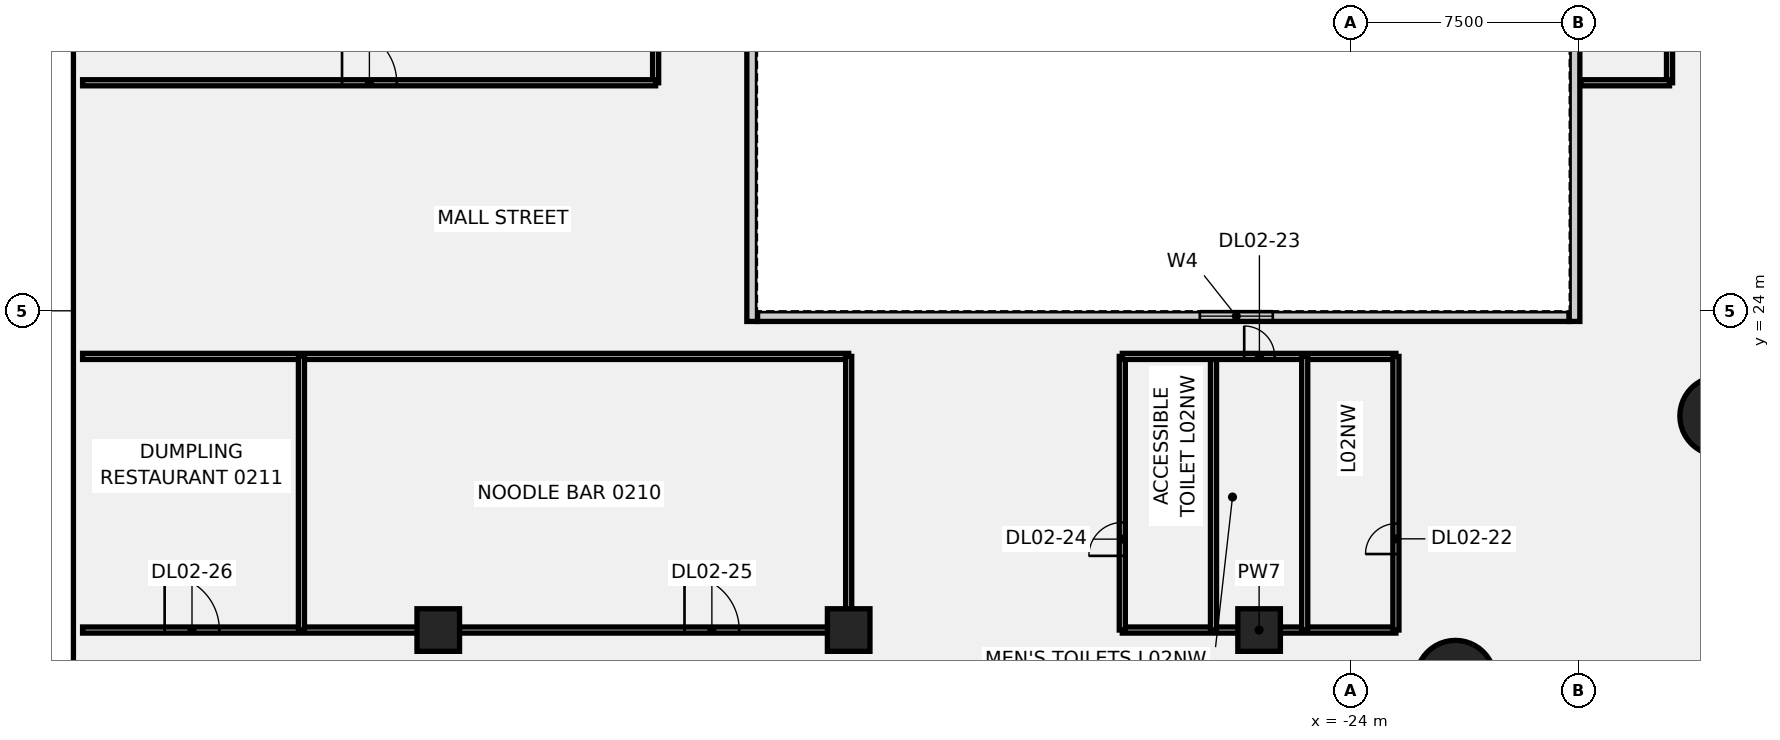
"""IFC4 building model, lengths in metres.
Left out: names, types, materials, properties, quantities, classifications, styles, units other than length and angle.
Written with IfcOpenShell. Run it as: python <this file> out.ifc"""

import sys

from ifc_helpers import new_model, si_unit, direction, frame, frame_2d, origin, origin_2d, place, context, subcontext, project, spatial, rectangle, circle, extrude, element, fill, save


model = new_model("IFC4")
c1 = context("Model", 3, precision=1e-05, world=origin(), true_north=direction((0.0, 1.0)))
c2 = subcontext(c1, "Body", "Model", "MODEL_VIEW")
j1 = project(units=[si_unit("LENGTHUNIT", "METRE"), si_unit("PLANEANGLEUNIT", "RADIAN")], contexts=[c1])
p1 = place(None, origin())
s1 = spatial("IfcSite", under=j1, at=p1, CompositionType="ELEMENT")
p2 = place(p1, origin())
s2 = spatial("IfcBuilding", under=s1, at=p2, CompositionType="ELEMENT")
p3 = place(p2, frame((0.0, 0.0, 15.0)))
s3 = spatial("IfcBuildingStorey", under=s2, at=p3, CompositionType="ELEMENT", Elevation=15.0)
for number, where, z_axis, x_axis in (
    (1, (-11.86, 20.543, -0.5), (0.0, 0.0, 1.0), (1.0, 0.0, 0.0)),
    (2, (-20.543, 11.86, -0.5), (0.0, 0.0, 1.0), (1.0, 0.0, 0.0)),
):
    element("IfcColumn", number, at=place(p3, frame(where, z_axis=z_axis, x_axis=x_axis)), inside=s3, PredefinedType="COLUMN", context=c2, shape_type="SweptSolid", body=[
        extrude(circle(Radius=1.3, at=origin_2d()), origin(), (0.0, 0.0, 1.0), 5.0),
    ])
for number, where, z_axis, x_axis in (
    (3, (-54.0, 13.5, -0.5), (0.0, 0.0, 1.0), (1.0, 0.0, 0.0)),
    (4, (-40.5, 13.5, -0.5), (0.0, 0.0, 1.0), (1.0, 0.0, 0.0)),
    (5, (-27.0, 13.5, -0.5), (0.0, 0.0, 1.0), (1.0, 0.0, 0.0)),
):
    element("IfcColumn", number, at=place(p3, frame(where, z_axis=z_axis, x_axis=x_axis)), inside=s3, PredefinedType="COLUMN", context=c2, shape_type="SweptSolid", body=[
        extrude(rectangle(XDim=1.4, YDim=1.4, at=origin_2d()), origin(), (0.0, 0.0, 1.0), 5.0),
    ])
p4 = place(p3, frame((-65.699, 13.5, 0.0), z_axis=(0.0, 0.0, 1.0), x_axis=(1.0, 0.0, 0.0)))
e6 = element("IfcWall", 6, at=p4, inside=s3, PredefinedType="PARTITIONING", context=c2, shape_type="SweptSolid", body=[
    extrude(rectangle(XDim=25.199, YDim=0.2, at=frame_2d((12.6, 0.0))), origin(), (0.0, 0.0, 1.0), 4.5),
])
p5 = place(p4, frame((19.799, 0.0, 0.0)))
e7 = element("IfcOpeningElement", 7, at=p5, cuts=e6, PredefinedType="OPENING", context=c2, shape_type="SweptSolid", body=[
    extrude(rectangle(XDim=1.8, YDim=2.1, at=frame_2d((0.9, 1.05))), frame((0.0, 0.11, 0.0), z_axis=(0.0, -1.0, 0.0), x_axis=(1.0, 0.0, 0.0)), (0.0, 0.0, 1.0), 0.22),
])
p6 = place(p4, frame((2.699, 0.0, 0.0)))
e8 = element("IfcOpeningElement", 8, at=p6, cuts=e6, PredefinedType="OPENING", context=c2, shape_type="SweptSolid", body=[
    extrude(rectangle(XDim=1.8, YDim=2.1, at=frame_2d((0.9, 1.05))), frame((0.0, 0.11, 0.0), z_axis=(0.0, -1.0, 0.0), x_axis=(1.0, 0.0, 0.0)), (0.0, 0.0, 1.0), 0.22),
])
p7 = place(p3, frame((-65.699, 22.5, 0.0), z_axis=(0.0, 0.0, 1.0), x_axis=(1.0, 0.0, 0.0)))
e9 = element("IfcWall", 9, at=p7, inside=s3, PredefinedType="PARTITIONING", context=c2, shape_type="SweptSolid", body=[
    extrude(rectangle(XDim=25.199, YDim=0.2, at=frame_2d((12.6, 0.0))), origin(), (0.0, 0.0, 1.0), 4.5),
])
p8 = place(p3, frame((-46.85, 31.5, 0.0), z_axis=(0.0, 0.0, 1.0), x_axis=(0.0, 1.0, 0.0)))
e10 = element("IfcWall", 10, at=p8, inside=s3, PredefinedType="PARTITIONING", context=c2, shape_type="SweptSolid", body=[
    extrude(rectangle(XDim=9.0, YDim=0.2, at=frame_2d((4.5, 0.0))), origin(), (0.0, 0.0, 1.0), 4.5),
])
p9 = place(p3, frame((-65.699, 31.5, 0.0), z_axis=(0.0, 0.0, 1.0), x_axis=(1.0, 0.0, 0.0)))
e11 = element("IfcWall", 11, at=p9, inside=s3, PredefinedType="PARTITIONING", context=c2, shape_type="SweptSolid", body=[
    extrude(rectangle(XDim=18.849, YDim=0.2, at=frame_2d((9.424, 0.0))), origin(), (0.0, 0.0, 1.0), 4.5),
])
p10 = place(p9, frame((8.534, 0.0, 0.0)))
e12 = element("IfcOpeningElement", 12, at=p10, cuts=e11, PredefinedType="OPENING", context=c2, shape_type="SweptSolid", body=[
    extrude(rectangle(XDim=1.8, YDim=2.1, at=frame_2d((0.9, 1.05))), frame((0.0, 0.11, 0.0), z_axis=(0.0, -1.0, 0.0), x_axis=(1.0, 0.0, 0.0)), (0.0, 0.0, 1.0), 0.22),
])
for number, where, z_axis, x_axis in (
    (13, (-40.5, 13.5, 0.0), (0.0, 0.0, 1.0), (0.0, 1.0, 0.0)),
    (14, (-58.5, 13.5, 0.0), (0.0, 0.0, 1.0), (0.0, 1.0, 0.0)),
    (15, (-31.5, 13.5, 0.0), (0.0, 0.0, 1.0), (1.0, 0.0, 0.0)),
    (16, (-28.5, 13.5, 0.0), (0.0, 0.0, 1.0), (0.0, 1.0, 0.0)),
):
    element("IfcWall", number, at=place(p3, frame(where, z_axis=z_axis, x_axis=x_axis)), inside=s3, PredefinedType="PARTITIONING", context=c2, shape_type="SweptSolid", body=[
        extrude(rectangle(XDim=9.0, YDim=0.2, at=frame_2d((4.5, 0.0))), origin(), (0.0, 0.0, 1.0), 4.5),
    ])
p11 = place(p3, frame((-31.5, 13.5, 0.0), z_axis=(0.0, 0.0, 1.0), x_axis=(0.0, 1.0, 0.0)))
e17 = element("IfcWall", 17, at=p11, inside=s3, PredefinedType="PARTITIONING", context=c2, shape_type="SweptSolid", body=[
    extrude(rectangle(XDim=9.0, YDim=0.2, at=frame_2d((4.5, 0.0))), origin(), (0.0, 0.0, 1.0), 4.5),
])
p12 = place(p11, frame((2.44, 0.0, 0.0)))
e18 = element("IfcOpeningElement", 18, at=p12, cuts=e17, PredefinedType="OPENING", context=c2, shape_type="SweptSolid", body=[
    extrude(rectangle(XDim=1.1, YDim=2.1, at=frame_2d((0.55, 1.05))), frame((0.0, 0.11, 0.0), z_axis=(0.0, -1.0, 0.0), x_axis=(1.0, 0.0, 0.0)), (0.0, 0.0, 1.0), 0.22),
])
p13 = place(p3, frame((-31.5, 22.5, 0.0), z_axis=(0.0, 0.0, 1.0), x_axis=(1.0, 0.0, 0.0)))
e19 = element("IfcWall", 19, at=p13, inside=s3, PredefinedType="PARTITIONING", context=c2, shape_type="SweptSolid", body=[
    extrude(rectangle(XDim=9.0, YDim=0.2, at=frame_2d((4.5, 0.0))), origin(), (0.0, 0.0, 1.0), 4.5),
])
p14 = place(p13, frame((4.01, 0.0, 0.0)))
e20 = element("IfcOpeningElement", 20, at=p14, cuts=e19, PredefinedType="OPENING", context=c2, shape_type="SweptSolid", body=[
    extrude(rectangle(XDim=1.0, YDim=2.1, at=frame_2d((0.5, 1.05))), frame((0.0, 0.11, 0.0), z_axis=(0.0, -1.0, 0.0), x_axis=(1.0, 0.0, 0.0)), (0.0, 0.0, 1.0), 0.22),
])
p15 = place(p3, frame((-22.5, 13.5, 0.0), z_axis=(0.0, 0.0, 1.0), x_axis=(0.0, 1.0, 0.0)))
e21 = element("IfcWall", 21, at=p15, inside=s3, PredefinedType="PARTITIONING", context=c2, shape_type="SweptSolid", body=[
    extrude(rectangle(XDim=9.0, YDim=0.2, at=frame_2d((4.5, 0.0))), origin(), (0.0, 0.0, 1.0), 4.5),
])
p16 = place(p15, frame((2.5, 0.0, 0.0)))
e22 = element("IfcOpeningElement", 22, at=p16, cuts=e21, PredefinedType="OPENING", context=c2, shape_type="SweptSolid", body=[
    extrude(rectangle(XDim=1.0, YDim=2.1, at=frame_2d((0.5, 1.05))), frame((0.0, 0.11, 0.0), z_axis=(0.0, -1.0, 0.0), x_axis=(1.0, 0.0, 0.0)), (0.0, 0.0, 1.0), 0.22),
])
p17 = place(p3, frame((-25.5, 13.5, 0.0), z_axis=(0.0, 0.0, 1.0), x_axis=(0.0, 1.0, 0.0)))
e23 = element("IfcWall", 23, at=p17, inside=s3, PredefinedType="PARTITIONING", context=c2, shape_type="SweptSolid", body=[
    extrude(rectangle(XDim=9.0, YDim=0.2, at=frame_2d((4.5, 0.0))), origin(), (0.0, 0.0, 1.0), 4.5),
])
p18 = place(p3, frame((-13.5, 31.5, 0.0), z_axis=(0.0, 0.0, 1.0), x_axis=(0.0, 1.0, 0.0)))
e24 = element("IfcWall", 24, at=p18, inside=s3, PredefinedType="PARTITIONING", context=c2, shape_type="SweptSolid", body=[
    extrude(rectangle(XDim=9.0, YDim=0.2, at=frame_2d((4.5, 0.0))), origin(), (0.0, 0.0, 1.0), 4.5),
])
p19 = place(p18, frame((3.61, 0.0, 0.0)))
e25 = element("IfcOpeningElement", 25, at=p19, cuts=e24, PredefinedType="OPENING", context=c2, shape_type="SweptSolid", body=[
    extrude(rectangle(XDim=1.8, YDim=2.1, at=frame_2d((0.9, 1.05))), frame((0.0, 0.11, 0.0), z_axis=(0.0, -1.0, 0.0), x_axis=(1.0, 0.0, 0.0)), (0.0, 0.0, 1.0), 0.22),
])
p20 = place(p3, frame((-16.42, 31.5, 0.0), z_axis=(0.0, 0.0, 1.0), x_axis=(1.0, 0.0, 0.0)))
e26 = element("IfcWall", 26, at=p20, inside=s3, PredefinedType="PARTITIONING", context=c2, shape_type="SweptSolid", body=[
    extrude(rectangle(XDim=2.92, YDim=0.2, at=frame_2d((1.46, 0.0))), origin(), (0.0, 0.0, 1.0), 4.5),
])
p21 = place(p3, frame((-43.5, 23.825, 0.0), z_axis=(0.0, 0.0, 1.0), x_axis=(1.0, 0.0, 0.0)))
e27 = element("IfcWall", 27, at=p21, inside=s3, PredefinedType="SOLIDWALL", context=c2, shape_type="SweptSolid", body=[
    extrude(rectangle(XDim=26.7, YDim=0.35, at=frame_2d((13.35, 0.0))), origin(), (0.0, 0.0, 1.0), 4.5),
])
p22 = place(p21, frame((14.55, 0.0, 1.0)))
e28 = element("IfcOpeningElement", 28, at=p22, cuts=e27, PredefinedType="OPENING", context=c2, shape_type="SweptSolid", body=[
    extrude(rectangle(XDim=2.4, YDim=1.8, at=frame_2d((1.2, 0.9))), frame((0.0, 0.185, 0.0), z_axis=(0.0, -1.0, 0.0), x_axis=(1.0, 0.0, 0.0)), (0.0, 0.0, 1.0), 0.37),
])
p23 = place(p3, frame((-43.675, 23.65, 0.0), z_axis=(0.0, 0.0, 1.0), x_axis=(0.0, 1.0, 0.0)))
e29 = element("IfcWall", 29, at=p23, inside=s3, PredefinedType="SOLIDWALL", context=c2, shape_type="SweptSolid", body=[
    extrude(rectangle(XDim=18.7, YDim=0.35, at=frame_2d((9.35, 0.0))), origin(), (0.0, 0.0, 1.0), 4.5),
])
p24 = place(p23, frame((14.3, 0.0, 1.0)))
e30 = element("IfcOpeningElement", 30, at=p24, cuts=e29, PredefinedType="OPENING", context=c2, shape_type="SweptSolid", body=[
    extrude(rectangle(XDim=2.4, YDim=1.8, at=frame_2d((1.2, 0.9))), frame((0.0, 0.185, 0.0), z_axis=(0.0, -1.0, 0.0), x_axis=(1.0, 0.0, 0.0)), (0.0, 0.0, 1.0), 0.37),
])
p25 = place(p3, frame((-16.625, 23.65, 0.0), z_axis=(0.0, 0.0, 1.0), x_axis=(0.0, 1.0, 0.0)))
e31 = element("IfcWall", 31, at=p25, inside=s3, PredefinedType="SOLIDWALL", context=c2, shape_type="SweptSolid", body=[
    extrude(rectangle(XDim=18.7, YDim=0.35, at=frame_2d((9.35, 0.0))), origin(), (0.0, 0.0, 1.0), 4.5),
])
p26 = place(p25, frame((14.3, 0.0, 1.0)))
e32 = element("IfcOpeningElement", 32, at=p26, cuts=e31, PredefinedType="OPENING", context=c2, shape_type="SweptSolid", body=[
    extrude(rectangle(XDim=2.4, YDim=1.8, at=frame_2d((1.2, 0.9))), frame((0.0, 0.185, 0.0), z_axis=(0.0, -1.0, 0.0), x_axis=(1.0, 0.0, 0.0)), (0.0, 0.0, 1.0), 0.37),
])
p27 = place(p16, origin())
e33 = element("IfcDoor", 33, at=p27, inside=s3, OperationType="SINGLE_SWING_RIGHT", PredefinedType="DOOR", context=c2, shape_type="SweptSolid", body=[
    extrude(rectangle(XDim=1.0, YDim=2.1, at=frame_2d((0.5, 1.05))), frame((0.0, 0.025, 0.0), z_axis=(0.0, -1.0, 0.0), x_axis=(1.0, 0.0, 0.0)), (0.0, 0.0, 1.0), 0.05),
])
fill(e22, e33)
p28 = place(p14, origin())
e34 = element("IfcDoor", 34, at=p28, inside=s3, OperationType="SINGLE_SWING_LEFT", PredefinedType="DOOR", context=c2, shape_type="SweptSolid", body=[
    extrude(rectangle(XDim=1.0, YDim=2.1, at=frame_2d((0.5, 1.05))), frame((0.0, 0.025, 0.0), z_axis=(0.0, -1.0, 0.0), x_axis=(1.0, 0.0, 0.0)), (0.0, 0.0, 1.0), 0.05),
])
fill(e20, e34)
p29 = place(p12, origin())
e35 = element("IfcDoor", 35, at=p29, inside=s3, OperationType="SINGLE_SWING_RIGHT", PredefinedType="DOOR", context=c2, shape_type="SweptSolid", body=[
    extrude(rectangle(XDim=1.1, YDim=2.1, at=frame_2d((0.55, 1.05))), frame((0.0, 0.025, 0.0), z_axis=(0.0, -1.0, 0.0), x_axis=(1.0, 0.0, 0.0)), (0.0, 0.0, 1.0), 0.05),
])
fill(e18, e35)
p30 = place(p5, origin())
e36 = element("IfcDoor", 36, at=p30, inside=s3, OperationType="SINGLE_SWING_LEFT", PredefinedType="DOOR", context=c2, shape_type="SweptSolid", body=[
    extrude(rectangle(XDim=1.8, YDim=2.1, at=frame_2d((0.9, 1.05))), frame((0.0, 0.025, 0.0), z_axis=(0.0, -1.0, 0.0), x_axis=(1.0, 0.0, 0.0)), (0.0, 0.0, 1.0), 0.05),
])
fill(e7, e36)
p31 = place(p6, origin())
e37 = element("IfcDoor", 37, at=p31, inside=s3, OperationType="SINGLE_SWING_RIGHT", PredefinedType="DOOR", context=c2, shape_type="SweptSolid", body=[
    extrude(rectangle(XDim=1.8, YDim=2.1, at=frame_2d((0.9, 1.05))), frame((0.0, 0.025, 0.0), z_axis=(0.0, -1.0, 0.0), x_axis=(1.0, 0.0, 0.0)), (0.0, 0.0, 1.0), 0.05),
])
fill(e8, e37)
p32 = place(p10, origin())
e38 = element("IfcDoor", 38, at=p32, inside=s3, OperationType="SINGLE_SWING_RIGHT", PredefinedType="DOOR", context=c2, shape_type="SweptSolid", body=[
    extrude(rectangle(XDim=1.8, YDim=2.1, at=frame_2d((0.9, 1.05))), frame((0.0, 0.025, 0.0), z_axis=(0.0, -1.0, 0.0), x_axis=(1.0, 0.0, 0.0)), (0.0, 0.0, 1.0), 0.05),
])
fill(e12, e38)
p33 = place(p22, origin())
e39 = element("IfcWindow", 39, at=p33, inside=s3, PartitioningType="SINGLE_PANEL", PredefinedType="WINDOW", context=c2, shape_type="SweptSolid", body=[
    extrude(rectangle(XDim=2.4, YDim=1.8, at=frame_2d((1.2, 0.9))), frame((0.0, 0.03, 0.0), z_axis=(0.0, -1.0, 0.0), x_axis=(1.0, 0.0, 0.0)), (0.0, 0.0, 1.0), 0.06),
])
fill(e28, e39)
save(model, sys.argv[1])
